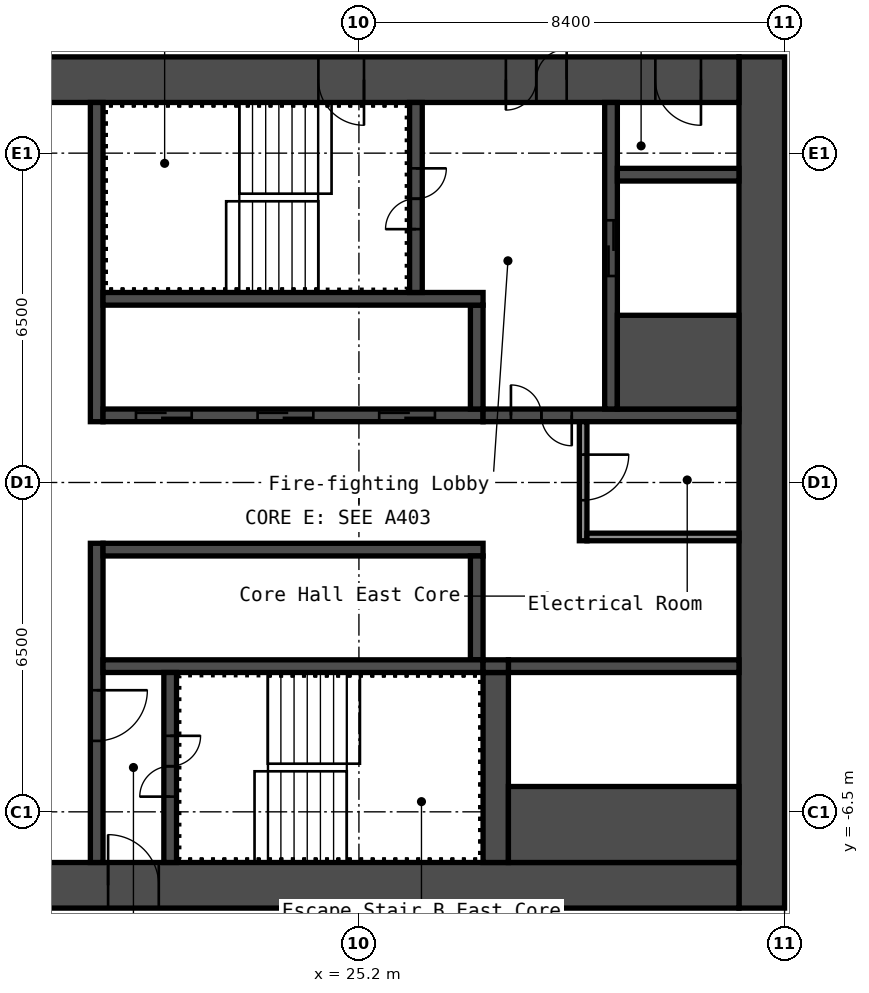
"""IFC4 building model, lengths in metres.
Left out: names, types, materials, properties, quantities, classifications, styles, units other than length and angle.
Written with IfcOpenShell. Run it as: python <this file> out.ifc"""

import sys

from ifc_helpers import new_model, si_unit, direction, frame, frame_2d, origin, place, context, subcontext, project, spatial, rectangle, extrude, element, fill, save


model = new_model("IFC4")
c1 = context("Model", 3, precision=1e-05, world=origin(), true_north=direction((0.0, 1.0)))
c2 = subcontext(c1, "Body", "Model", "MODEL_VIEW")
j1 = project(units=[si_unit("LENGTHUNIT", "METRE"), si_unit("PLANEANGLEUNIT", "RADIAN")], contexts=[c1])
p1 = place(None, origin())
s1 = spatial("IfcSite", under=j1, at=p1, CompositionType="ELEMENT")
p2 = place(p1, origin())
s2 = spatial("IfcBuilding", under=s1, at=p2, CompositionType="ELEMENT")
p3 = place(p2, frame((0.0, 0.0, 15.0)))
s3 = spatial("IfcBuildingStorey", under=s2, at=p3, CompositionType="ELEMENT", Elevation=15.0)
p4 = place(p3, frame((33.15, -8.4, 0.0), z_axis=(0.0, 0.0, 1.0), x_axis=(0.0, 1.0, 0.0)))
e1 = element("IfcWall", 1, at=p4, inside=s3, PredefinedType="SHEAR", context=c2, shape_type="SweptSolid", body=[
    extrude(rectangle(XDim=16.8, YDim=0.9, at=frame_2d((8.4, 0.0))), origin(), (0.0, 0.0, 1.0), 4.4),
])
p5 = place(p3, frame((17.7, 7.95, 0.0), z_axis=(0.0, 0.0, 1.0), x_axis=(1.0, 0.0, 0.0)))
e2 = element("IfcWall", 2, at=p5, inside=s3, PredefinedType="SHEAR", context=c2, shape_type="SweptSolid", body=[
    extrude(rectangle(XDim=15.0, YDim=0.9, at=frame_2d((7.5, 0.0))), origin(), (0.0, 0.0, 1.0), 4.4),
])
p6 = place(p5, frame((10.4, 0.0, 0.0)))
e3 = element("IfcOpeningElement", 3, at=p6, cuts=e2, PredefinedType="OPENING", context=c2, shape_type="SweptSolid", body=[
    extrude(rectangle(XDim=1.2, YDim=2.1, at=frame_2d((0.6, 1.05))), frame((0.0, 0.46, 0.0), z_axis=(0.0, -1.0, 0.0), x_axis=(1.0, 0.0, 0.0)), (0.0, 0.0, 1.0), 0.92),
])
p7 = place(p5, frame((13.35, 0.0, 0.0)))
e4 = element("IfcOpeningElement", 4, at=p7, cuts=e2, PredefinedType="OPENING", context=c2, shape_type="SweptSolid", body=[
    extrude(rectangle(XDim=0.9, YDim=2.1, at=frame_2d((0.45, 1.05))), frame((0.0, 0.46, 0.0), z_axis=(0.0, -1.0, 0.0), x_axis=(1.0, 0.0, 0.0)), (0.0, 0.0, 1.0), 0.92),
])
p8 = place(p5, frame((6.7, 0.0, 0.0)))
e5 = element("IfcOpeningElement", 5, at=p8, cuts=e2, PredefinedType="OPENING", context=c2, shape_type="SweptSolid", body=[
    extrude(rectangle(XDim=0.9, YDim=2.1, at=frame_2d((0.45, 1.05))), frame((0.0, 0.46, 0.0), z_axis=(0.0, -1.0, 0.0), x_axis=(1.0, 0.0, 0.0)), (0.0, 0.0, 1.0), 0.92),
])
p9 = place(p3, frame((17.7, -7.95, 0.0), z_axis=(0.0, 0.0, 1.0), x_axis=(1.0, 0.0, 0.0)))
e6 = element("IfcWall", 6, at=p9, inside=s3, PredefinedType="SHEAR", context=c2, shape_type="SweptSolid", body=[
    extrude(rectangle(XDim=15.0, YDim=0.9, at=frame_2d((7.5, 0.0))), origin(), (0.0, 0.0, 1.0), 4.4),
])
p10 = place(p9, frame((2.55, 0.0, 0.0)))
e7 = element("IfcOpeningElement", 7, at=p10, cuts=e6, PredefinedType="OPENING", context=c2, shape_type="SweptSolid", body=[
    extrude(rectangle(XDim=1.0, YDim=2.1, at=frame_2d((0.5, 1.05))), frame((0.0, 0.46, 0.0), z_axis=(0.0, -1.0, 0.0), x_axis=(1.0, 0.0, 0.0)), (0.0, 0.0, 1.0), 0.92),
])
p11 = place(p3, frame((20.025, 1.2, 0.0), z_axis=(0.0, 0.0, 1.0), x_axis=(0.0, 1.0, 0.0)))
e8 = element("IfcWall", 8, at=p11, inside=s3, PredefinedType="SHEAR", context=c2, shape_type="SweptSolid", body=[
    extrude(rectangle(XDim=6.3, YDim=0.25, at=frame_2d((3.15, 0.0))), origin(), (0.0, 0.0, 1.0), 4.4),
])
p12 = place(p3, frame((20.025, -7.5, 0.0), z_axis=(0.0, 0.0, 1.0), x_axis=(0.0, 1.0, 0.0)))
e9 = element("IfcWall", 9, at=p12, inside=s3, PredefinedType="SHEAR", context=c2, shape_type="SweptSolid", body=[
    extrude(rectangle(XDim=6.3, YDim=0.25, at=frame_2d((3.15, 0.0))), origin(), (0.0, 0.0, 1.0), 4.4),
])
p13 = place(p12, frame((2.4, 0.0, 0.0)))
e10 = element("IfcOpeningElement", 10, at=p13, cuts=e9, PredefinedType="OPENING", context=c2, shape_type="SweptSolid", body=[
    extrude(rectangle(XDim=1.0, YDim=2.1, at=frame_2d((0.5, 1.05))), frame((0.0, 0.135, 0.0), z_axis=(0.0, -1.0, 0.0), x_axis=(1.0, 0.0, 0.0)), (0.0, 0.0, 1.0), 0.27),
])
p14 = place(p3, frame((20.15, 1.325, 0.0), z_axis=(0.0, 0.0, 1.0), x_axis=(1.0, 0.0, 0.0)))
e11 = element("IfcWall", 11, at=p14, inside=s3, PredefinedType="SHEAR", context=c2, shape_type="SweptSolid", body=[
    extrude(rectangle(XDim=7.5, YDim=0.25, at=frame_2d((3.75, 0.0))), origin(), (0.0, 0.0, 1.0), 4.4),
])
p15 = place(p14, frame((0.65, 0.0, 0.0)))
e12 = element("IfcOpeningElement", 12, at=p15, cuts=e11, PredefinedType="OPENING", context=c2, shape_type="SweptSolid", body=[
    extrude(rectangle(XDim=1.1, YDim=2.1, at=frame_2d((0.55, 1.05))), frame((0.0, 0.135, 0.0), z_axis=(0.0, -1.0, 0.0), x_axis=(1.0, 0.0, 0.0)), (0.0, 0.0, 1.0), 0.27),
])
p16 = place(p14, frame((3.05, 0.0, 0.0)))
e13 = element("IfcOpeningElement", 13, at=p16, cuts=e11, PredefinedType="OPENING", context=c2, shape_type="SweptSolid", body=[
    extrude(rectangle(XDim=1.1, YDim=2.1, at=frame_2d((0.55, 1.05))), frame((0.0, 0.135, 0.0), z_axis=(0.0, -1.0, 0.0), x_axis=(1.0, 0.0, 0.0)), (0.0, 0.0, 1.0), 0.27),
])
p17 = place(p14, frame((5.45, 0.0, 0.0)))
e14 = element("IfcOpeningElement", 14, at=p17, cuts=e11, PredefinedType="OPENING", context=c2, shape_type="SweptSolid", body=[
    extrude(rectangle(XDim=1.1, YDim=2.1, at=frame_2d((0.55, 1.05))), frame((0.0, 0.135, 0.0), z_axis=(0.0, -1.0, 0.0), x_axis=(1.0, 0.0, 0.0)), (0.0, 0.0, 1.0), 0.27),
])
p18 = place(p3, frame((27.525, 1.45, 0.0), z_axis=(0.0, 0.0, 1.0), x_axis=(0.0, 1.0, 0.0)))
e15 = element("IfcWall", 15, at=p18, inside=s3, PredefinedType="SHEAR", context=c2, shape_type="SweptSolid", body=[
    extrude(rectangle(XDim=2.05, YDim=0.25, at=frame_2d((1.025, 0.0))), origin(), (0.0, 0.0, 1.0), 4.4),
])
p19 = place(p3, frame((20.15, 3.625, 0.0), z_axis=(0.0, 0.0, 1.0), x_axis=(1.0, 0.0, 0.0)))
e16 = element("IfcWall", 16, at=p19, inside=s3, PredefinedType="SHEAR", context=c2, shape_type="SweptSolid", body=[
    extrude(rectangle(XDim=7.5, YDim=0.25, at=frame_2d((3.75, 0.0))), origin(), (0.0, 0.0, 1.0), 4.4),
])
p20 = place(p3, frame((26.325, 3.75, 0.0), z_axis=(0.0, 0.0, 1.0), x_axis=(0.0, 1.0, 0.0)))
e17 = element("IfcWall", 17, at=p20, inside=s3, PredefinedType="SHEAR", context=c2, shape_type="SweptSolid", body=[
    extrude(rectangle(XDim=3.75, YDim=0.25, at=frame_2d((1.875, 0.0))), origin(), (0.0, 0.0, 1.0), 4.4),
])
p21 = place(p20, frame((1.25, 0.0, 0.0)))
e18 = element("IfcOpeningElement", 18, at=p21, cuts=e17, PredefinedType="OPENING", context=c2, shape_type="SweptSolid", body=[
    extrude(rectangle(XDim=1.2, YDim=2.1, at=frame_2d((0.6, 1.05))), frame((0.0, 0.135, 0.0), z_axis=(0.0, -1.0, 0.0), x_axis=(1.0, 0.0, 0.0)), (0.0, 0.0, 1.0), 0.27),
])
p22 = place(p3, frame((27.65, 1.325, 0.0), z_axis=(0.0, 0.0, 1.0), x_axis=(1.0, 0.0, 0.0)))
e19 = element("IfcWall", 19, at=p22, inside=s3, PredefinedType="SHEAR", context=c2, shape_type="SweptSolid", body=[
    extrude(rectangle(XDim=5.05, YDim=0.25, at=frame_2d((2.525, 0.0))), origin(), (0.0, 0.0, 1.0), 4.4),
])
p23 = place(p22, frame((0.55, 0.0, 0.0)))
e20 = element("IfcOpeningElement", 20, at=p23, cuts=e19, PredefinedType="OPENING", context=c2, shape_type="SweptSolid", body=[
    extrude(rectangle(XDim=1.2, YDim=2.1, at=frame_2d((0.6, 1.05))), frame((0.0, 0.135, 0.0), z_axis=(0.0, -1.0, 0.0), x_axis=(1.0, 0.0, 0.0)), (0.0, 0.0, 1.0), 0.27),
])
p24 = place(p3, frame((30.175, 1.45, 0.0), z_axis=(0.0, 0.0, 1.0), x_axis=(0.0, 1.0, 0.0)))
e21 = element("IfcWall", 21, at=p24, inside=s3, PredefinedType="SHEAR", context=c2, shape_type="SweptSolid", body=[
    extrude(rectangle(XDim=6.05, YDim=0.25, at=frame_2d((3.025, 0.0))), origin(), (0.0, 0.0, 1.0), 4.4),
])
p25 = place(p24, frame((2.625, 0.0, 0.0)))
e22 = element("IfcOpeningElement", 22, at=p25, cuts=e21, PredefinedType="OPENING", context=c2, shape_type="SweptSolid", body=[
    extrude(rectangle(XDim=1.1, YDim=2.1, at=frame_2d((0.55, 1.05))), frame((0.0, 0.135, 0.0), z_axis=(0.0, -1.0, 0.0), x_axis=(1.0, 0.0, 0.0)), (0.0, 0.0, 1.0), 0.27),
])
p26 = place(p3, frame((30.3, 2.375, 0.0), z_axis=(0.0, 0.0, 1.0), x_axis=(1.0, 0.0, 0.0)))
e23 = element("IfcWall", 23, at=p26, inside=s3, PredefinedType="SHEAR", context=c2, shape_type="SweptSolid", body=[
    extrude(rectangle(XDim=2.4, YDim=1.85, at=frame_2d((1.2, 0.0))), origin(), (0.0, 0.0, 1.0), 4.4),
])
p27 = place(p3, frame((30.3, 6.075, 0.0), z_axis=(0.0, 0.0, 1.0), x_axis=(1.0, 0.0, 0.0)))
e24 = element("IfcWall", 24, at=p27, inside=s3, PredefinedType="SHEAR", context=c2, shape_type="SweptSolid", body=[
    extrude(rectangle(XDim=2.4, YDim=0.25, at=frame_2d((1.2, 0.0))), origin(), (0.0, 0.0, 1.0), 4.4),
])
p28 = place(p3, frame((20.15, -1.325, 0.0), z_axis=(0.0, 0.0, 1.0), x_axis=(1.0, 0.0, 0.0)))
e25 = element("IfcWall", 25, at=p28, inside=s3, PredefinedType="SHEAR", context=c2, shape_type="SweptSolid", body=[
    extrude(rectangle(XDim=7.5, YDim=0.25, at=frame_2d((3.75, 0.0))), origin(), (0.0, 0.0, 1.0), 4.4),
])
p29 = place(p3, frame((27.525, -3.5, 0.0), z_axis=(0.0, 0.0, 1.0), x_axis=(0.0, 1.0, 0.0)))
e26 = element("IfcWall", 26, at=p29, inside=s3, PredefinedType="SHEAR", context=c2, shape_type="SweptSolid", body=[
    extrude(rectangle(XDim=2.05, YDim=0.25, at=frame_2d((1.025, 0.0))), origin(), (0.0, 0.0, 1.0), 4.4),
])
p30 = place(p3, frame((20.15, -3.625, 0.0), z_axis=(0.0, 0.0, 1.0), x_axis=(1.0, 0.0, 0.0)))
e27 = element("IfcWall", 27, at=p30, inside=s3, PredefinedType="SHEAR", context=c2, shape_type="SweptSolid", body=[
    extrude(rectangle(XDim=7.5, YDim=0.25, at=frame_2d((3.75, 0.0))), origin(), (0.0, 0.0, 1.0), 4.4),
])
p31 = place(p3, frame((21.475, -7.5, 0.0), z_axis=(0.0, 0.0, 1.0), x_axis=(0.0, 1.0, 0.0)))
e28 = element("IfcWall", 28, at=p31, inside=s3, PredefinedType="SHEAR", context=c2, shape_type="SweptSolid", body=[
    extrude(rectangle(XDim=3.75, YDim=0.25, at=frame_2d((1.875, 0.0))), origin(), (0.0, 0.0, 1.0), 4.4),
])
p32 = place(p31, frame((1.3, 0.0, 0.0)))
e29 = element("IfcOpeningElement", 29, at=p32, cuts=e28, PredefinedType="OPENING", context=c2, shape_type="SweptSolid", body=[
    extrude(rectangle(XDim=1.2, YDim=2.1, at=frame_2d((0.6, 1.05))), frame((0.0, 0.135, 0.0), z_axis=(0.0, -1.0, 0.0), x_axis=(1.0, 0.0, 0.0)), (0.0, 0.0, 1.0), 0.27),
])
p33 = place(p3, frame((27.9, -7.5, 0.0), z_axis=(0.0, 0.0, 1.0), x_axis=(0.0, 1.0, 0.0)))
e30 = element("IfcWall", 30, at=p33, inside=s3, PredefinedType="SHEAR", context=c2, shape_type="SweptSolid", body=[
    extrude(rectangle(XDim=3.75, YDim=0.5, at=frame_2d((1.875, 0.0))), origin(), (0.0, 0.0, 1.0), 4.4),
])
p34 = place(p3, frame((28.15, -3.625, 0.0), z_axis=(0.0, 0.0, 1.0), x_axis=(1.0, 0.0, 0.0)))
e31 = element("IfcWall", 31, at=p34, inside=s3, PredefinedType="SHEAR", context=c2, shape_type="SweptSolid", body=[
    extrude(rectangle(XDim=4.55, YDim=0.25, at=frame_2d((2.275, 0.0))), origin(), (0.0, 0.0, 1.0), 4.4),
])
p35 = place(p3, frame((28.15, -6.75, 0.0), z_axis=(0.0, 0.0, 1.0), x_axis=(1.0, 0.0, 0.0)))
e32 = element("IfcWall", 32, at=p35, inside=s3, PredefinedType="SHEAR", context=c2, shape_type="SweptSolid", body=[
    extrude(rectangle(XDim=4.55, YDim=1.5, at=frame_2d((2.275, 0.0))), origin(), (0.0, 0.0, 1.0), 4.4),
])
p36 = place(p3, frame((27.65, -3.625, 0.0), z_axis=(0.0, 0.0, 1.0), x_axis=(1.0, 0.0, 0.0)))
e33 = element("IfcWall", 33, at=p36, inside=s3, PredefinedType="SHEAR", context=c2, shape_type="SweptSolid", body=[
    extrude(rectangle(XDim=0.5, YDim=0.25, at=frame_2d((0.25, 0.0))), origin(), (0.0, 0.0, 1.0), 4.4),
])
p37 = place(p3, frame((29.625, -1.15, 0.0), z_axis=(0.0, 0.0, 1.0), x_axis=(0.0, 1.0, 0.0)))
e34 = element("IfcWall", 34, at=p37, inside=s3, PredefinedType="PARTITIONING", context=c2, shape_type="SweptSolid", body=[
    extrude(rectangle(XDim=2.35, YDim=0.15, at=frame_2d((1.175, 0.0))), origin(), (0.0, 0.0, 1.0), 4.4),
])
p38 = place(p37, frame((0.8, 0.0, 0.0)))
e35 = element("IfcOpeningElement", 35, at=p38, cuts=e34, PredefinedType="OPENING", context=c2, shape_type="SweptSolid", body=[
    extrude(rectangle(XDim=0.9, YDim=2.1, at=frame_2d((0.45, 1.05))), frame((0.0, 0.085, 0.0), z_axis=(0.0, -1.0, 0.0), x_axis=(1.0, 0.0, 0.0)), (0.0, 0.0, 1.0), 0.17),
])
p39 = place(p3, frame((29.7, -1.075, 0.0), z_axis=(0.0, 0.0, 1.0), x_axis=(1.0, 0.0, 0.0)))
e36 = element("IfcWall", 36, at=p39, inside=s3, PredefinedType="PARTITIONING", context=c2, shape_type="SweptSolid", body=[
    extrude(rectangle(XDim=3.0, YDim=0.15, at=frame_2d((1.5, 0.0))), origin(), (0.0, 0.0, 1.0), 4.4),
])
p40 = place(p6, origin())
e37 = element("IfcDoor", 37, at=p40, inside=s3, OperationType="DOUBLE_DOOR_SINGLE_SWING", PredefinedType="DOOR", context=c2, shape_type="SweptSolid", body=[
    extrude(rectangle(XDim=1.2, YDim=2.1, at=frame_2d((0.6, 1.05))), frame((0.0, 0.025, 0.0), z_axis=(0.0, -1.0, 0.0), x_axis=(1.0, 0.0, 0.0)), (0.0, 0.0, 1.0), 0.05),
])
fill(e3, e37)
p41 = place(p7, origin())
e38 = element("IfcDoor", 38, at=p41, inside=s3, OperationType="SINGLE_SWING_RIGHT", PredefinedType="DOOR", context=c2, shape_type="SweptSolid", body=[
    extrude(rectangle(XDim=0.9, YDim=2.1, at=frame_2d((0.45, 1.05))), frame((0.0, 0.025, 0.0), z_axis=(0.0, -1.0, 0.0), x_axis=(1.0, 0.0, 0.0)), (0.0, 0.0, 1.0), 0.05),
])
fill(e4, e38)
p42 = place(p10, origin())
e39 = element("IfcDoor", 39, at=p42, inside=s3, OperationType="SINGLE_SWING_RIGHT", PredefinedType="DOOR", context=c2, shape_type="SweptSolid", body=[
    extrude(rectangle(XDim=1.0, YDim=2.1, at=frame_2d((0.5, 1.05))), frame((0.0, 0.025, 0.0), z_axis=(0.0, -1.0, 0.0), x_axis=(1.0, 0.0, 0.0)), (0.0, 0.0, 1.0), 0.05),
])
fill(e7, e39)
p43 = place(p8, origin())
e40 = element("IfcDoor", 40, at=p43, inside=s3, OperationType="SINGLE_SWING_RIGHT", PredefinedType="DOOR", context=c2, shape_type="SweptSolid", body=[
    extrude(rectangle(XDim=0.9, YDim=2.1, at=frame_2d((0.45, 1.05))), frame((0.0, 0.025, 0.0), z_axis=(0.0, -1.0, 0.0), x_axis=(1.0, 0.0, 0.0)), (0.0, 0.0, 1.0), 0.05),
])
fill(e5, e40)
p44 = place(p21, origin())
e41 = element("IfcDoor", 41, at=p44, inside=s3, OperationType="DOUBLE_DOOR_SINGLE_SWING", PredefinedType="DOOR", context=c2, shape_type="SweptSolid", body=[
    extrude(rectangle(XDim=1.2, YDim=2.1, at=frame_2d((0.6, 1.05))), frame((0.0, 0.025, 0.0), z_axis=(0.0, -1.0, 0.0), x_axis=(1.0, 0.0, 0.0)), (0.0, 0.0, 1.0), 0.05),
])
fill(e18, e41)
p45 = place(p32, origin())
e42 = element("IfcDoor", 42, at=p45, inside=s3, OperationType="DOUBLE_DOOR_SINGLE_SWING", PredefinedType="DOOR", context=c2, shape_type="SweptSolid", body=[
    extrude(rectangle(XDim=1.2, YDim=2.1, at=frame_2d((0.6, 1.05))), frame((0.0, 0.025, 0.0), z_axis=(0.0, -1.0, 0.0), x_axis=(1.0, 0.0, 0.0)), (0.0, 0.0, 1.0), 0.05),
])
fill(e29, e42)
p46 = place(p13, origin())
e43 = element("IfcDoor", 43, at=p46, inside=s3, OperationType="SINGLE_SWING_RIGHT", PredefinedType="DOOR", context=c2, shape_type="SweptSolid", body=[
    extrude(rectangle(XDim=1.0, YDim=2.1, at=frame_2d((0.5, 1.05))), frame((0.0, 0.025, 0.0), z_axis=(0.0, -1.0, 0.0), x_axis=(1.0, 0.0, 0.0)), (0.0, 0.0, 1.0), 0.05),
])
fill(e10, e43)
p47 = place(p23, origin())
e44 = element("IfcDoor", 44, at=p47, inside=s3, OperationType="DOUBLE_DOOR_SINGLE_SWING", PredefinedType="DOOR", context=c2, shape_type="SweptSolid", body=[
    extrude(rectangle(XDim=1.2, YDim=2.1, at=frame_2d((0.6, 1.05))), frame((0.0, 0.025, 0.0), z_axis=(0.0, -1.0, 0.0), x_axis=(1.0, 0.0, 0.0)), (0.0, 0.0, 1.0), 0.05),
])
fill(e20, e44)
p48 = place(p38, origin())
e45 = element("IfcDoor", 45, at=p48, inside=s3, OperationType="SINGLE_SWING_RIGHT", PredefinedType="DOOR", context=c2, shape_type="SweptSolid", body=[
    extrude(rectangle(XDim=0.9, YDim=2.1, at=frame_2d((0.45, 1.05))), frame((0.0, 0.025, 0.0), z_axis=(0.0, -1.0, 0.0), x_axis=(1.0, 0.0, 0.0)), (0.0, 0.0, 1.0), 0.05),
])
fill(e35, e45)
p49 = place(p15, origin())
e46 = element("IfcDoor", 46, at=p49, inside=s3, OperationType="DOUBLE_DOOR_SLIDING", PredefinedType="DOOR", context=c2, shape_type="SweptSolid", body=[
    extrude(rectangle(XDim=1.1, YDim=2.1, at=frame_2d((0.55, 1.05))), frame((0.0, 0.025, 0.0), z_axis=(0.0, -1.0, 0.0), x_axis=(1.0, 0.0, 0.0)), (0.0, 0.0, 1.0), 0.05),
])
fill(e12, e46)
p50 = place(p16, origin())
e47 = element("IfcDoor", 47, at=p50, inside=s3, OperationType="DOUBLE_DOOR_SLIDING", PredefinedType="DOOR", context=c2, shape_type="SweptSolid", body=[
    extrude(rectangle(XDim=1.1, YDim=2.1, at=frame_2d((0.55, 1.05))), frame((0.0, 0.025, 0.0), z_axis=(0.0, -1.0, 0.0), x_axis=(1.0, 0.0, 0.0)), (0.0, 0.0, 1.0), 0.05),
])
fill(e13, e47)
p51 = place(p17, origin())
e48 = element("IfcDoor", 48, at=p51, inside=s3, OperationType="DOUBLE_DOOR_SLIDING", PredefinedType="DOOR", context=c2, shape_type="SweptSolid", body=[
    extrude(rectangle(XDim=1.1, YDim=2.1, at=frame_2d((0.55, 1.05))), frame((0.0, 0.025, 0.0), z_axis=(0.0, -1.0, 0.0), x_axis=(1.0, 0.0, 0.0)), (0.0, 0.0, 1.0), 0.05),
])
fill(e14, e48)
p52 = place(p25, origin())
e49 = element("IfcDoor", 49, at=p52, inside=s3, OperationType="DOUBLE_DOOR_SLIDING", PredefinedType="DOOR", context=c2, shape_type="SweptSolid", body=[
    extrude(rectangle(XDim=1.1, YDim=2.1, at=frame_2d((0.55, 1.05))), frame((0.0, 0.025, 0.0), z_axis=(0.0, -1.0, 0.0), x_axis=(1.0, 0.0, 0.0)), (0.0, 0.0, 1.0), 0.05),
])
fill(e22, e49)
save(model, sys.argv[1])
